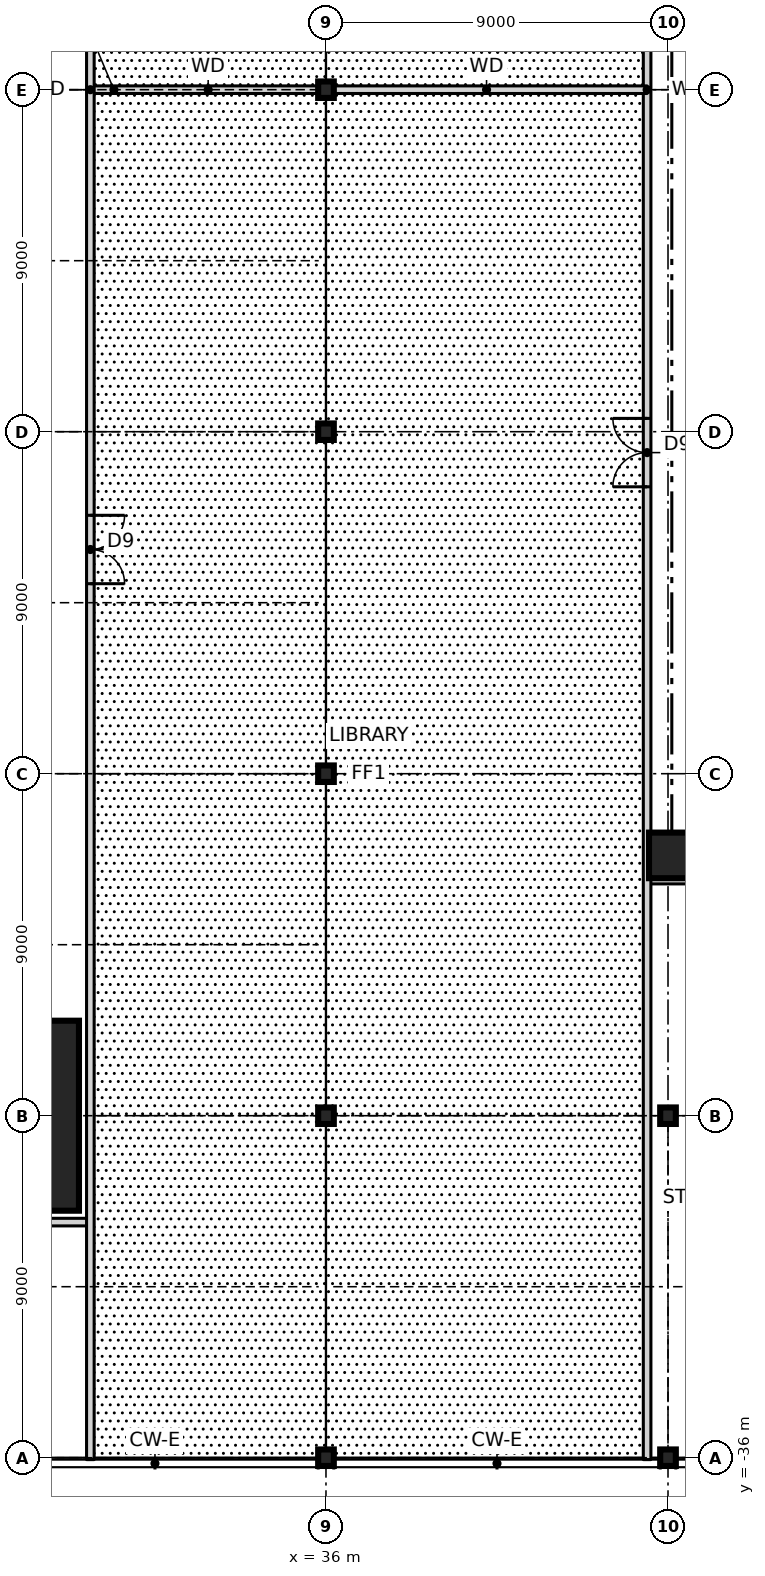
"""IFC4 building model, lengths in metres.
Left out: names, types, materials, properties, quantities, classifications, styles, units other than length and angle.
Written with IfcOpenShell. Run it as: python <this file> out.ifc"""

import sys

from ifc_helpers import new_model, si_unit, direction, frame, frame_2d, origin, origin_2d, place, context, subcontext, project, spatial, rectangle, hollow_rectangle, i_section, extrude, element, fill, save


model = new_model("IFC4")
c1 = context("Model", 3, precision=1e-05, world=origin(), true_north=direction((0.0, 1.0)))
c2 = subcontext(c1, "Body", "Model", "MODEL_VIEW")
j1 = project(units=[si_unit("LENGTHUNIT", "METRE"), si_unit("PLANEANGLEUNIT", "RADIAN")], contexts=[c1])
p1 = place(None, origin())
s1 = spatial("IfcSite", under=j1, at=p1, CompositionType="ELEMENT")
p2 = place(p1, origin())
s2 = spatial("IfcBuilding", under=s1, at=p2, CompositionType="ELEMENT")
p3 = place(p2, frame((0.0, 0.0, 6.0)))
s3 = spatial("IfcBuildingStorey", under=s2, at=p3, CompositionType="ELEMENT", Elevation=6.0)
p4 = place(p3, frame((27.0, -27.0, 0.0), z_axis=(0.0, 0.0, 1.0), x_axis=(1.0, 0.0, 0.0)))
e1 = element("IfcColumn", 1, at=p4, inside=s3, PredefinedType="COLUMN", context=c2, shape_type="SweptSolid", body=[
    extrude(rectangle(XDim=5.0, YDim=5.0, at=origin_2d()), origin(), (0.0, 0.0, 1.0), 4.5),
    extrude(i_section(OverallWidth=0.478, OverallDepth=0.599, WebThickness=0.1, FlangeThickness=0.14, at=origin_2d()), origin(), (0.0, 0.0, 1.0), 4.5),
])
p5 = place(p3, frame((45.1, -20.15, 0.0), z_axis=(0.0, 0.0, 1.0), x_axis=(1.0, 0.0, 0.0)))
e2 = element("IfcColumn", 2, at=p5, inside=s3, PredefinedType="COLUMN", context=c2, shape_type="SweptSolid", body=[
    extrude(hollow_rectangle(XDim=1.2, YDim=1.2, WallThickness=0.07, at=origin_2d()), origin(), (0.0, 0.0, 1.0), 4.5),
])
for number, where, z_axis, x_axis in (
    (3, (36.0, -36.0, 0.0), (0.0, 0.0, 1.0), (1.0, 0.0, 0.0)),
    (4, (36.0, -27.0, 0.0), (0.0, 0.0, 1.0), (1.0, 0.0, 0.0)),
    (5, (36.0, -18.0, 0.0), (0.0, 0.0, 1.0), (1.0, 0.0, 0.0)),
    (6, (36.0, -9.0, 0.0), (0.0, 0.0, 1.0), (1.0, 0.0, 0.0)),
    (7, (36.0, 0.0, 0.0), (0.0, 0.0, 1.0), (1.0, 0.0, 0.0)),
    (8, (45.0, -36.0, 0.0), (0.0, 0.0, 1.0), (1.0, 0.0, 0.0)),
    (9, (45.0, -27.0, 0.0), (0.0, 0.0, 1.0), (1.0, 0.0, 0.0)),
):
    element("IfcColumn", number, at=place(p3, frame(where, z_axis=z_axis, x_axis=x_axis)), inside=s3, PredefinedType="COLUMN", context=c2, shape_type="SweptSolid", body=[
        extrude(i_section(OverallWidth=0.411, OverallDepth=0.434, WebThickness=0.036, FlangeThickness=0.057, at=origin_2d()), origin(), (0.0, 0.0, 1.0), 4.5),
    ])
p6 = place(p2, origin())
s4 = spatial("IfcBuildingStorey", under=s2, at=p6, CompositionType="ELEMENT", Elevation=0.0)
p7 = place(p6, frame((44.494, -36.25, -0.15), z_axis=(0.0, 0.0, 1.0), x_axis=(0.0, -1.0, 0.0)))
e10 = element("IfcWall", 10, at=p7, inside=s4, PredefinedType="SOLIDWALL", context=c2, shape_type="SweptSolid", body=[
    extrude(rectangle(XDim=3.05, YDim=0.6, at=frame_2d((1.525, 0.0))), origin(), (0.0, 0.0, 1.0), 9.15),
])
p8 = place(p3, frame((-29.8, -29.8, 0.0), z_axis=(0.0, 0.0, 1.0), x_axis=(1.0, 0.0, 0.0)))
e11 = element("IfcWall", 11, at=p8, inside=s3, PredefinedType="SOLIDWALL", context=c2, shape_type="SweptSolid", body=[
    extrude(rectangle(XDim=59.6, YDim=0.2, at=frame_2d((29.8, 0.0))), origin(), (0.0, 0.0, 1.0), 4.25),
])
p9 = place(p8, frame((8.1, 0.0, 0.0)))
e12 = element("IfcOpeningElement", 12, at=p9, cuts=e11, PredefinedType="OPENING", context=c2, shape_type="SweptSolid", body=[
    extrude(rectangle(XDim=1.8, YDim=2.1, at=frame_2d((0.9, 1.05))), frame((0.0, 0.11, 0.0), z_axis=(0.0, -1.0, 0.0), x_axis=(1.0, 0.0, 0.0)), (0.0, 0.0, 1.0), 0.22),
])
p10 = place(p8, frame((22.9, 0.0, 0.0)))
e13 = element("IfcOpeningElement", 13, at=p10, cuts=e11, PredefinedType="OPENING", context=c2, shape_type="SweptSolid", body=[
    extrude(rectangle(XDim=1.8, YDim=2.1, at=frame_2d((0.9, 1.05))), frame((0.0, 0.11, 0.0), z_axis=(0.0, -1.0, 0.0), x_axis=(1.0, 0.0, 0.0)), (0.0, 0.0, 1.0), 0.22),
])
p11 = place(p8, frame((28.9, 0.0, 0.0)))
e14 = element("IfcOpeningElement", 14, at=p11, cuts=e11, PredefinedType="OPENING", context=c2, shape_type="SweptSolid", body=[
    extrude(rectangle(XDim=1.8, YDim=2.1, at=frame_2d((0.9, 1.05))), frame((0.0, 0.11, 0.0), z_axis=(0.0, -1.0, 0.0), x_axis=(1.0, 0.0, 0.0)), (0.0, 0.0, 1.0), 0.22),
])
p12 = place(p8, frame((33.2, 0.0, 0.0)))
e15 = element("IfcOpeningElement", 15, at=p12, cuts=e11, PredefinedType="OPENING", context=c2, shape_type="SweptSolid", body=[
    extrude(rectangle(XDim=1.8, YDim=2.1, at=frame_2d((0.9, 1.05))), frame((0.0, 0.11, 0.0), z_axis=(0.0, -1.0, 0.0), x_axis=(1.0, 0.0, 0.0)), (0.0, 0.0, 1.0), 0.22),
])
p13 = place(p8, frame((41.0, 0.0, 0.0)))
e16 = element("IfcOpeningElement", 16, at=p13, cuts=e11, PredefinedType="OPENING", context=c2, shape_type="SweptSolid", body=[
    extrude(rectangle(XDim=1.8, YDim=2.1, at=frame_2d((0.9, 1.05))), frame((0.0, 0.11, 0.0), z_axis=(0.0, -1.0, 0.0), x_axis=(1.0, 0.0, 0.0)), (0.0, 0.0, 1.0), 0.22),
])
p14 = place(p8, frame((50.2, 0.0, 0.0)))
e17 = element("IfcOpeningElement", 17, at=p14, cuts=e11, PredefinedType="OPENING", context=c2, shape_type="SweptSolid", body=[
    extrude(rectangle(XDim=1.8, YDim=2.1, at=frame_2d((0.9, 1.05))), frame((0.0, 0.11, 0.0), z_axis=(0.0, -1.0, 0.0), x_axis=(1.0, 0.0, 0.0)), (0.0, 0.0, 1.0), 0.22),
])
p15 = place(p3, frame((44.45, -20.8, 0.0), z_axis=(0.0, 0.0, 1.0), x_axis=(1.0, 0.0, 0.0)))
e18 = element("IfcWall", 18, at=p15, inside=s3, PredefinedType="SOLIDWALL", context=c2, shape_type="SweptSolid", body=[
    extrude(rectangle(XDim=37.1, YDim=0.2, at=frame_2d((18.55, 0.0))), origin(), (0.0, 0.0, 1.0), 4.25),
])
p16 = place(p15, frame((2.575, 0.0, 0.0)))
e19 = element("IfcOpeningElement", 19, at=p16, cuts=e18, PredefinedType="OPENING", context=c2, shape_type="SweptSolid", body=[
    extrude(rectangle(XDim=1.8, YDim=2.1, at=frame_2d((0.9, 1.05))), frame((0.0, 0.11, 0.0), z_axis=(0.0, -1.0, 0.0), x_axis=(1.0, 0.0, 0.0)), (0.0, 0.0, 1.0), 0.22),
])
p17 = place(p15, frame((24.125, 0.0, 0.0)))
e20 = element("IfcOpeningElement", 20, at=p17, cuts=e18, PredefinedType="OPENING", context=c2, shape_type="SweptSolid", body=[
    extrude(rectangle(XDim=1.8, YDim=2.1, at=frame_2d((0.9, 1.05))), frame((0.0, 0.11, 0.0), z_axis=(0.0, -1.0, 0.0), x_axis=(1.0, 0.0, 0.0)), (0.0, 0.0, 1.0), 0.22),
])
p18 = place(p15, frame((10.35, 0.0, 0.0)))
e21 = element("IfcOpeningElement", 21, at=p18, cuts=e18, PredefinedType="OPENING", context=c2, shape_type="SweptSolid", body=[
    extrude(rectangle(XDim=1.8, YDim=2.1, at=frame_2d((0.9, 1.05))), frame((0.0, 0.11, 0.0), z_axis=(0.0, -1.0, 0.0), x_axis=(1.0, 0.0, 0.0)), (0.0, 0.0, 1.0), 0.22),
])
p19 = place(p3, frame((29.8, 0.0, 0.0), z_axis=(0.0, 0.0, 1.0), x_axis=(1.0, 0.0, 0.0)))
e22 = element("IfcWall", 22, at=p19, inside=s3, PredefinedType="SOLIDWALL", context=c2, shape_type="SweptSolid", body=[
    extrude(rectangle(XDim=6.2, YDim=0.2, at=frame_2d((3.1, 0.0))), origin(), (0.0, 0.0, 1.0), 3.48),
])
p20 = place(p3, frame((44.45, -36.05, 0.0), z_axis=(0.0, 0.0, 1.0), x_axis=(0.0, 1.0, 0.0)))
e23 = element("IfcWall", 23, at=p20, inside=s3, PredefinedType="SOLIDWALL", context=c2, shape_type="SweptSolid", body=[
    extrude(rectangle(XDim=72.1, YDim=0.2, at=frame_2d((36.05, 0.0))), origin(), (0.0, 0.0, 1.0), 4.25),
])
p21 = place(p20, frame((25.6, 0.0, 0.0)))
e24 = element("IfcOpeningElement", 24, at=p21, cuts=e23, PredefinedType="OPENING", context=c2, shape_type="SweptSolid", body=[
    extrude(rectangle(XDim=1.8, YDim=2.1, at=frame_2d((0.9, 1.05))), frame((0.0, 0.11, 0.0), z_axis=(0.0, -1.0, 0.0), x_axis=(1.0, 0.0, 0.0)), (0.0, 0.0, 1.0), 0.22),
])
p22 = place(p20, frame((44.7, 0.0, 0.0)))
e25 = element("IfcOpeningElement", 25, at=p22, cuts=e23, PredefinedType="OPENING", context=c2, shape_type="SweptSolid", body=[
    extrude(rectangle(XDim=1.8, YDim=2.1, at=frame_2d((0.9, 1.05))), frame((0.0, 0.11, 0.0), z_axis=(0.0, -1.0, 0.0), x_axis=(1.0, 0.0, 0.0)), (0.0, 0.0, 1.0), 0.22),
])
p23 = place(p3, frame((29.8, -36.05, 0.0), z_axis=(0.0, 0.0, 1.0), x_axis=(0.0, 1.0, 0.0)))
e26 = element("IfcWall", 26, at=p23, inside=s3, PredefinedType="SOLIDWALL", context=c2, shape_type="SweptSolid", body=[
    extrude(rectangle(XDim=72.1, YDim=0.2, at=frame_2d((36.05, 0.0))), origin(), (0.0, 0.0, 1.0), 4.25),
])
p24 = place(p23, frame((23.05, 0.0, 0.0)))
e27 = element("IfcOpeningElement", 27, at=p24, cuts=e26, PredefinedType="OPENING", context=c2, shape_type="SweptSolid", body=[
    extrude(rectangle(XDim=1.8, YDim=2.1, at=frame_2d((0.9, 1.05))), frame((0.0, 0.11, 0.0), z_axis=(0.0, -1.0, 0.0), x_axis=(1.0, 0.0, 0.0)), (0.0, 0.0, 1.0), 0.22),
])
p25 = place(p23, frame((47.25, 0.0, 0.0)))
e28 = element("IfcOpeningElement", 28, at=p25, cuts=e26, PredefinedType="OPENING", context=c2, shape_type="SweptSolid", body=[
    extrude(rectangle(XDim=1.8, YDim=2.1, at=frame_2d((0.9, 1.05))), frame((0.0, 0.11, 0.0), z_axis=(0.0, -1.0, 0.0), x_axis=(1.0, 0.0, 0.0)), (0.0, 0.0, 1.0), 0.22),
])
p26 = place(p3, frame((36.0, 0.0, 0.0), z_axis=(0.0, 0.0, 1.0), x_axis=(1.0, 0.0, 0.0)))
e29 = element("IfcWall", 29, at=p26, inside=s3, PredefinedType="SOLIDWALL", context=c2, shape_type="SweptSolid", body=[
    extrude(rectangle(XDim=8.45, YDim=0.2, at=frame_2d((4.225, 0.0))), origin(), (0.0, 0.0, 1.0), 4.25),
])
p27 = place(p24, frame((1.8, 0.0, 0.0), z_axis=(0.0, 0.0, 1.0), x_axis=(-1.0, 0.0, 0.0)))
e30 = element("IfcDoor", 30, at=p27, inside=s3, OperationType="DOUBLE_DOOR_SINGLE_SWING", PredefinedType="DOOR", context=c2, shape_type="SweptSolid", body=[
    extrude(rectangle(XDim=1.8, YDim=2.1, at=frame_2d((0.9, 1.05))), frame((0.0, 0.025, 0.0), z_axis=(0.0, -1.0, 0.0), x_axis=(1.0, 0.0, 0.0)), (0.0, 0.0, 1.0), 0.05),
])
fill(e27, e30)
p28 = place(p21, origin())
e31 = element("IfcDoor", 31, at=p28, inside=s3, OperationType="DOUBLE_DOOR_SINGLE_SWING", PredefinedType="DOOR", context=c2, shape_type="SweptSolid", body=[
    extrude(rectangle(XDim=1.8, YDim=2.1, at=frame_2d((0.9, 1.05))), frame((0.0, 0.025, 0.0), z_axis=(0.0, -1.0, 0.0), x_axis=(1.0, 0.0, 0.0)), (0.0, 0.0, 1.0), 0.05),
])
fill(e24, e31)
save(model, sys.argv[1])
